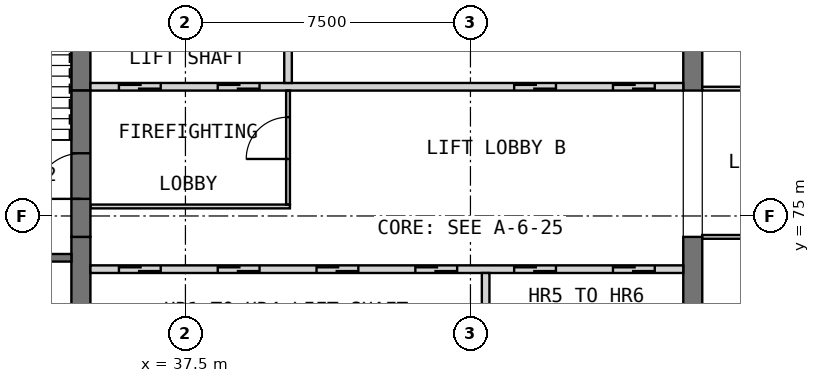
"""IFC4 building model, lengths in metres.
Left out: names, types, materials, properties, quantities, classifications, styles, units other than length and angle.
Written with IfcOpenShell. Run it as: python <this file> out.ifc"""

import sys

from ifc_helpers import new_model, si_unit, direction, frame, frame_2d, origin, place, context, subcontext, project, spatial, rectangle, extrude, element, fill, save


model = new_model("IFC4")
c1 = context("Model", 3, precision=1e-05, world=origin(), true_north=direction((0.0, 1.0)))
c2 = subcontext(c1, "Body", "Model", "MODEL_VIEW")
j1 = project(units=[si_unit("LENGTHUNIT", "METRE"), si_unit("PLANEANGLEUNIT", "RADIAN")], contexts=[c1])
p1 = place(None, origin())
s1 = spatial("IfcSite", under=j1, at=p1, CompositionType="ELEMENT")
p2 = place(p1, origin())
s2 = spatial("IfcBuilding", under=s1, at=p2, CompositionType="ELEMENT")
p3 = place(p2, frame((0.0, 0.0, 182.7)))
s3 = spatial("IfcBuildingStorey", under=s2, at=p3, CompositionType="ELEMENT", Elevation=182.7)
p4 = place(p3, frame((34.75, 68.05, 0.0), z_axis=(0.0, 0.0, 1.0), x_axis=(0.0, 1.0, 0.0)))
e1 = element("IfcWall", 1, at=p4, inside=s3, PredefinedType="SHEAR", context=c2, shape_type="SweptSolid", body=[
    extrude(rectangle(XDim=6.4, YDim=0.5, at=frame_2d((3.2, 0.0))), origin(), (0.0, 0.0, 1.0), 3.5),
])
p5 = place(p3, frame((34.75, 78.3, 0.0), z_axis=(0.0, 0.0, 1.0), x_axis=(0.0, 1.0, 0.0)))
e2 = element("IfcWall", 2, at=p5, inside=s3, PredefinedType="SHEAR", context=c2, shape_type="SweptSolid", body=[
    extrude(rectangle(XDim=3.4, YDim=0.5, at=frame_2d((1.7, 0.0))), origin(), (0.0, 0.0, 1.0), 3.5),
])
p6 = place(p3, frame((50.85, 68.05, 0.0), z_axis=(0.0, 0.0, 1.0), x_axis=(0.0, 1.0, 0.0)))
e3 = element("IfcWall", 3, at=p6, inside=s3, PredefinedType="SHEAR", context=c2, shape_type="SweptSolid", body=[
    extrude(rectangle(XDim=6.4, YDim=0.5, at=frame_2d((3.2, 0.0))), origin(), (0.0, 0.0, 1.0), 3.5),
])
p7 = place(p3, frame((50.85, 78.3, 0.0), z_axis=(0.0, 0.0, 1.0), x_axis=(0.0, 1.0, 0.0)))
e4 = element("IfcWall", 4, at=p7, inside=s3, PredefinedType="SHEAR", context=c2, shape_type="SweptSolid", body=[
    extrude(rectangle(XDim=3.4, YDim=0.5, at=frame_2d((1.7, 0.0))), origin(), (0.0, 0.0, 1.0), 3.5),
])
p8 = place(p3, frame((35.0, 73.6, 0.0), z_axis=(0.0, 0.0, 1.0), x_axis=(1.0, 0.0, 0.0)))
e5 = element("IfcWall", 5, at=p8, inside=s3, PredefinedType="SOLIDWALL", context=c2, shape_type="SweptSolid", body=[
    extrude(rectangle(XDim=15.6, YDim=0.2, at=frame_2d((7.8, 0.0))), origin(), (0.0, 0.0, 1.0), 3.5),
])
p9 = place(p8, frame((0.75, 0.0, 0.0)))
e6 = element("IfcOpeningElement", 6, at=p9, cuts=e5, PredefinedType="OPENING", context=c2, shape_type="SweptSolid", body=[
    extrude(rectangle(XDim=1.1, YDim=2.1, at=frame_2d((0.55, 1.05))), frame((0.0, 0.11, 0.0), z_axis=(0.0, -1.0, 0.0), x_axis=(1.0, 0.0, 0.0)), (0.0, 0.0, 1.0), 0.22),
])
p10 = place(p8, frame((3.35, 0.0, 0.0)))
e7 = element("IfcOpeningElement", 7, at=p10, cuts=e5, PredefinedType="OPENING", context=c2, shape_type="SweptSolid", body=[
    extrude(rectangle(XDim=1.1, YDim=2.1, at=frame_2d((0.55, 1.05))), frame((0.0, 0.11, 0.0), z_axis=(0.0, -1.0, 0.0), x_axis=(1.0, 0.0, 0.0)), (0.0, 0.0, 1.0), 0.22),
])
p11 = place(p8, frame((5.95, 0.0, 0.0)))
e8 = element("IfcOpeningElement", 8, at=p11, cuts=e5, PredefinedType="OPENING", context=c2, shape_type="SweptSolid", body=[
    extrude(rectangle(XDim=1.1, YDim=2.1, at=frame_2d((0.55, 1.05))), frame((0.0, 0.11, 0.0), z_axis=(0.0, -1.0, 0.0), x_axis=(1.0, 0.0, 0.0)), (0.0, 0.0, 1.0), 0.22),
])
p12 = place(p8, frame((8.55, 0.0, 0.0)))
e9 = element("IfcOpeningElement", 9, at=p12, cuts=e5, PredefinedType="OPENING", context=c2, shape_type="SweptSolid", body=[
    extrude(rectangle(XDim=1.1, YDim=2.1, at=frame_2d((0.55, 1.05))), frame((0.0, 0.11, 0.0), z_axis=(0.0, -1.0, 0.0), x_axis=(1.0, 0.0, 0.0)), (0.0, 0.0, 1.0), 0.22),
])
p13 = place(p8, frame((11.15, 0.0, 0.0)))
e10 = element("IfcOpeningElement", 10, at=p13, cuts=e5, PredefinedType="OPENING", context=c2, shape_type="SweptSolid", body=[
    extrude(rectangle(XDim=1.1, YDim=2.1, at=frame_2d((0.55, 1.05))), frame((0.0, 0.11, 0.0), z_axis=(0.0, -1.0, 0.0), x_axis=(1.0, 0.0, 0.0)), (0.0, 0.0, 1.0), 0.22),
])
p14 = place(p8, frame((13.75, 0.0, 0.0)))
e11 = element("IfcOpeningElement", 11, at=p14, cuts=e5, PredefinedType="OPENING", context=c2, shape_type="SweptSolid", body=[
    extrude(rectangle(XDim=1.1, YDim=2.1, at=frame_2d((0.55, 1.05))), frame((0.0, 0.11, 0.0), z_axis=(0.0, -1.0, 0.0), x_axis=(1.0, 0.0, 0.0)), (0.0, 0.0, 1.0), 0.22),
])
p15 = place(p3, frame((45.4, 71.5, 0.0), z_axis=(0.0, 0.0, 1.0), x_axis=(0.0, 1.0, 0.0)))
e12 = element("IfcWall", 12, at=p15, inside=s3, PredefinedType="SOLIDWALL", context=c2, shape_type="SweptSolid", body=[
    extrude(rectangle(XDim=2.0, YDim=0.2, at=frame_2d((1.0, 0.0))), origin(), (0.0, 0.0, 1.0), 3.5),
])
p16 = place(p3, frame((35.0, 78.4, 0.0), z_axis=(0.0, 0.0, 1.0), x_axis=(1.0, 0.0, 0.0)))
e13 = element("IfcWall", 13, at=p16, inside=s3, PredefinedType="SOLIDWALL", context=c2, shape_type="SweptSolid", body=[
    extrude(rectangle(XDim=15.6, YDim=0.2, at=frame_2d((7.8, 0.0))), origin(), (0.0, 0.0, 1.0), 3.5),
])
p17 = place(p16, frame((0.75, 0.0, 0.0)))
e14 = element("IfcOpeningElement", 14, at=p17, cuts=e13, PredefinedType="OPENING", context=c2, shape_type="SweptSolid", body=[
    extrude(rectangle(XDim=1.1, YDim=2.1, at=frame_2d((0.55, 1.05))), frame((0.0, 0.11, 0.0), z_axis=(0.0, -1.0, 0.0), x_axis=(1.0, 0.0, 0.0)), (0.0, 0.0, 1.0), 0.22),
])
p18 = place(p16, frame((3.35, 0.0, 0.0)))
e15 = element("IfcOpeningElement", 15, at=p18, cuts=e13, PredefinedType="OPENING", context=c2, shape_type="SweptSolid", body=[
    extrude(rectangle(XDim=1.1, YDim=2.1, at=frame_2d((0.55, 1.05))), frame((0.0, 0.11, 0.0), z_axis=(0.0, -1.0, 0.0), x_axis=(1.0, 0.0, 0.0)), (0.0, 0.0, 1.0), 0.22),
])
p19 = place(p16, frame((11.15, 0.0, 0.0)))
e16 = element("IfcOpeningElement", 16, at=p19, cuts=e13, PredefinedType="OPENING", context=c2, shape_type="SweptSolid", body=[
    extrude(rectangle(XDim=1.1, YDim=2.1, at=frame_2d((0.55, 1.05))), frame((0.0, 0.11, 0.0), z_axis=(0.0, -1.0, 0.0), x_axis=(1.0, 0.0, 0.0)), (0.0, 0.0, 1.0), 0.22),
])
p20 = place(p16, frame((13.75, 0.0, 0.0)))
e17 = element("IfcOpeningElement", 17, at=p20, cuts=e13, PredefinedType="OPENING", context=c2, shape_type="SweptSolid", body=[
    extrude(rectangle(XDim=1.1, YDim=2.1, at=frame_2d((0.55, 1.05))), frame((0.0, 0.11, 0.0), z_axis=(0.0, -1.0, 0.0), x_axis=(1.0, 0.0, 0.0)), (0.0, 0.0, 1.0), 0.22),
])
p21 = place(p3, frame((40.2, 78.5, 0.0), z_axis=(0.0, 0.0, 1.0), x_axis=(0.0, 1.0, 0.0)))
e18 = element("IfcWall", 18, at=p21, inside=s3, PredefinedType="SOLIDWALL", context=c2, shape_type="SweptSolid", body=[
    extrude(rectangle(XDim=3.2, YDim=0.2, at=frame_2d((1.6, 0.0))), origin(), (0.0, 0.0, 1.0), 3.5),
])
p22 = place(p3, frame((35.0, 75.25, 0.0), z_axis=(0.0, 0.0, 1.0), x_axis=(1.0, 0.0, 0.0)))
e19 = element("IfcWall", 19, at=p22, inside=s3, PredefinedType="PARTITIONING", context=c2, shape_type="SweptSolid", body=[
    extrude(rectangle(XDim=5.25, YDim=0.1, at=frame_2d((2.625, 0.0))), origin(), (0.0, 0.0, 1.0), 3.25),
])
p23 = place(p3, frame((40.2, 75.3, 0.0), z_axis=(0.0, 0.0, 1.0), x_axis=(0.0, 1.0, 0.0)))
e20 = element("IfcWall", 20, at=p23, inside=s3, PredefinedType="PARTITIONING", context=c2, shape_type="SweptSolid", body=[
    extrude(rectangle(XDim=3.0, YDim=0.1, at=frame_2d((1.5, 0.0))), origin(), (0.0, 0.0, 1.0), 3.25),
])
p24 = place(p23, frame((1.2, 0.0, 0.0)))
e21 = element("IfcOpeningElement", 21, at=p24, cuts=e20, PredefinedType="OPENING", context=c2, shape_type="SweptSolid", body=[
    extrude(rectangle(XDim=1.1, YDim=2.1, at=frame_2d((0.55, 1.05))), frame((0.0, 0.06, 0.0), z_axis=(0.0, -1.0, 0.0), x_axis=(1.0, 0.0, 0.0)), (0.0, 0.0, 1.0), 0.12),
])
p25 = place(p3, frame((34.75, 74.45, 0.0), z_axis=(0.0, 0.0, 1.0), x_axis=(0.0, 1.0, 0.0)))
e22 = element("IfcWall", 22, at=p25, inside=s3, PredefinedType="SOLIDWALL", context=c2, shape_type="SweptSolid", body=[
    extrude(rectangle(XDim=3.85, YDim=0.5, at=frame_2d((1.925, 0.0))), origin(), (0.0, 0.0, 1.0), 2.3),
])
p26 = place(p25, frame((1.0, 0.0, 0.0)))
e23 = element("IfcOpeningElement", 23, at=p26, cuts=e22, PredefinedType="OPENING", context=c2, shape_type="SweptSolid", body=[
    extrude(rectangle(XDim=1.2, YDim=2.1, at=frame_2d((0.6, 1.05))), frame((0.0, 0.26, 0.0), z_axis=(0.0, -1.0, 0.0), x_axis=(1.0, 0.0, 0.0)), (0.0, 0.0, 1.0), 0.52),
])
p27 = place(p3, frame((30.8, 73.9, 0.0), z_axis=(0.0, 0.0, 1.0), x_axis=(1.0, 0.0, 0.0)))
e24 = element("IfcWall", 24, at=p27, inside=s3, PredefinedType="SOLIDWALL", context=c2, shape_type="SweptSolid", body=[
    extrude(rectangle(XDim=3.7, YDim=0.2, at=frame_2d((1.85, 0.0))), origin(), (0.0, 0.0, 1.0), 3.25),
])
p28 = place(p27, frame((1.5, 0.0, 0.0)))
e25 = element("IfcOpeningElement", 25, at=p28, cuts=e24, PredefinedType="OPENING", context=c2, shape_type="SweptSolid", body=[
    extrude(rectangle(XDim=0.9, YDim=2.1, at=frame_2d((0.45, 1.05))), frame((0.0, 0.11, 0.0), z_axis=(0.0, -1.0, 0.0), x_axis=(1.0, 0.0, 0.0)), (0.0, 0.0, 1.0), 0.22),
])
p29 = place(p3, frame((51.1, 74.45, 0.0), z_axis=(0.0, 0.0, 1.0), x_axis=(1.0, 0.0, 0.0)))
e26 = element("IfcWall", 26, at=p29, inside=s3, PredefinedType="PARTITIONING", context=c2, shape_type="SweptSolid", body=[
    extrude(rectangle(XDim=8.1, YDim=0.1, at=frame_2d((4.05, 0.0))), origin(), (0.0, 0.0, 1.0), 3.25),
])
p30 = place(p29, frame((3.6, 0.0, 0.0)))
e27 = element("IfcOpeningElement", 27, at=p30, cuts=e26, PredefinedType="OPENING", context=c2, shape_type="SweptSolid", body=[
    extrude(rectangle(XDim=0.9, YDim=2.1, at=frame_2d((0.45, 1.05))), frame((0.0, 0.06, 0.0), z_axis=(0.0, -1.0, 0.0), x_axis=(1.0, 0.0, 0.0)), (0.0, 0.0, 1.0), 0.12),
])
p31 = place(p3, frame((51.1, 78.35, 0.0), z_axis=(0.0, 0.0, 1.0), x_axis=(1.0, 0.0, 0.0)))
e28 = element("IfcWall", 28, at=p31, inside=s3, PredefinedType="PARTITIONING", context=c2, shape_type="SweptSolid", body=[
    extrude(rectangle(XDim=8.1, YDim=0.1, at=frame_2d((4.05, 0.0))), origin(), (0.0, 0.0, 1.0), 3.25),
])
p32 = place(p31, frame((3.6, 0.0, 0.0)))
e29 = element("IfcOpeningElement", 29, at=p32, cuts=e28, PredefinedType="OPENING", context=c2, shape_type="SweptSolid", body=[
    extrude(rectangle(XDim=0.9, YDim=2.1, at=frame_2d((0.45, 1.05))), frame((0.0, 0.06, 0.0), z_axis=(0.0, -1.0, 0.0), x_axis=(1.0, 0.0, 0.0)), (0.0, 0.0, 1.0), 0.12),
])
p33 = place(p9, origin())
e30 = element("IfcDoor", 30, at=p33, inside=s3, OperationType="DOUBLE_DOOR_SLIDING", PredefinedType="DOOR", context=c2, shape_type="SweptSolid", body=[
    extrude(rectangle(XDim=1.1, YDim=2.1, at=frame_2d((0.55, 1.05))), frame((0.0, 0.025, 0.0), z_axis=(0.0, -1.0, 0.0), x_axis=(1.0, 0.0, 0.0)), (0.0, 0.0, 1.0), 0.05),
])
fill(e6, e30)
p34 = place(p10, origin())
e31 = element("IfcDoor", 31, at=p34, inside=s3, OperationType="DOUBLE_DOOR_SLIDING", PredefinedType="DOOR", context=c2, shape_type="SweptSolid", body=[
    extrude(rectangle(XDim=1.1, YDim=2.1, at=frame_2d((0.55, 1.05))), frame((0.0, 0.025, 0.0), z_axis=(0.0, -1.0, 0.0), x_axis=(1.0, 0.0, 0.0)), (0.0, 0.0, 1.0), 0.05),
])
fill(e7, e31)
p35 = place(p11, origin())
e32 = element("IfcDoor", 32, at=p35, inside=s3, OperationType="DOUBLE_DOOR_SLIDING", PredefinedType="DOOR", context=c2, shape_type="SweptSolid", body=[
    extrude(rectangle(XDim=1.1, YDim=2.1, at=frame_2d((0.55, 1.05))), frame((0.0, 0.025, 0.0), z_axis=(0.0, -1.0, 0.0), x_axis=(1.0, 0.0, 0.0)), (0.0, 0.0, 1.0), 0.05),
])
fill(e8, e32)
p36 = place(p12, origin())
e33 = element("IfcDoor", 33, at=p36, inside=s3, OperationType="DOUBLE_DOOR_SLIDING", PredefinedType="DOOR", context=c2, shape_type="SweptSolid", body=[
    extrude(rectangle(XDim=1.1, YDim=2.1, at=frame_2d((0.55, 1.05))), frame((0.0, 0.025, 0.0), z_axis=(0.0, -1.0, 0.0), x_axis=(1.0, 0.0, 0.0)), (0.0, 0.0, 1.0), 0.05),
])
fill(e9, e33)
p37 = place(p13, origin())
e34 = element("IfcDoor", 34, at=p37, inside=s3, OperationType="DOUBLE_DOOR_SLIDING", PredefinedType="DOOR", context=c2, shape_type="SweptSolid", body=[
    extrude(rectangle(XDim=1.1, YDim=2.1, at=frame_2d((0.55, 1.05))), frame((0.0, 0.025, 0.0), z_axis=(0.0, -1.0, 0.0), x_axis=(1.0, 0.0, 0.0)), (0.0, 0.0, 1.0), 0.05),
])
fill(e10, e34)
p38 = place(p14, origin())
e35 = element("IfcDoor", 35, at=p38, inside=s3, OperationType="DOUBLE_DOOR_SLIDING", PredefinedType="DOOR", context=c2, shape_type="SweptSolid", body=[
    extrude(rectangle(XDim=1.1, YDim=2.1, at=frame_2d((0.55, 1.05))), frame((0.0, 0.025, 0.0), z_axis=(0.0, -1.0, 0.0), x_axis=(1.0, 0.0, 0.0)), (0.0, 0.0, 1.0), 0.05),
])
fill(e11, e35)
p39 = place(p17, origin())
e36 = element("IfcDoor", 36, at=p39, inside=s3, OperationType="DOUBLE_DOOR_SLIDING", PredefinedType="DOOR", context=c2, shape_type="SweptSolid", body=[
    extrude(rectangle(XDim=1.1, YDim=2.1, at=frame_2d((0.55, 1.05))), frame((0.0, 0.025, 0.0), z_axis=(0.0, -1.0, 0.0), x_axis=(1.0, 0.0, 0.0)), (0.0, 0.0, 1.0), 0.05),
])
fill(e14, e36)
p40 = place(p18, origin())
e37 = element("IfcDoor", 37, at=p40, inside=s3, OperationType="DOUBLE_DOOR_SLIDING", PredefinedType="DOOR", context=c2, shape_type="SweptSolid", body=[
    extrude(rectangle(XDim=1.1, YDim=2.1, at=frame_2d((0.55, 1.05))), frame((0.0, 0.025, 0.0), z_axis=(0.0, -1.0, 0.0), x_axis=(1.0, 0.0, 0.0)), (0.0, 0.0, 1.0), 0.05),
])
fill(e15, e37)
p41 = place(p19, origin())
e38 = element("IfcDoor", 38, at=p41, inside=s3, OperationType="DOUBLE_DOOR_SLIDING", PredefinedType="DOOR", context=c2, shape_type="SweptSolid", body=[
    extrude(rectangle(XDim=1.1, YDim=2.1, at=frame_2d((0.55, 1.05))), frame((0.0, 0.025, 0.0), z_axis=(0.0, -1.0, 0.0), x_axis=(1.0, 0.0, 0.0)), (0.0, 0.0, 1.0), 0.05),
])
fill(e16, e38)
p42 = place(p20, origin())
e39 = element("IfcDoor", 39, at=p42, inside=s3, OperationType="DOUBLE_DOOR_SLIDING", PredefinedType="DOOR", context=c2, shape_type="SweptSolid", body=[
    extrude(rectangle(XDim=1.1, YDim=2.1, at=frame_2d((0.55, 1.05))), frame((0.0, 0.025, 0.0), z_axis=(0.0, -1.0, 0.0), x_axis=(1.0, 0.0, 0.0)), (0.0, 0.0, 1.0), 0.05),
])
fill(e17, e39)
p43 = place(p24, origin())
e40 = element("IfcDoor", 40, at=p43, inside=s3, OperationType="SINGLE_SWING_LEFT", PredefinedType="DOOR", context=c2, shape_type="SweptSolid", body=[
    extrude(rectangle(XDim=1.1, YDim=2.1, at=frame_2d((0.55, 1.05))), frame((0.0, 0.025, 0.0), z_axis=(0.0, -1.0, 0.0), x_axis=(1.0, 0.0, 0.0)), (0.0, 0.0, 1.0), 0.05),
])
fill(e21, e40)
p44 = place(p26, origin())
e41 = element("IfcDoor", 41, at=p44, inside=s3, OperationType="SINGLE_SWING_RIGHT", PredefinedType="DOOR", context=c2, shape_type="SweptSolid", body=[
    extrude(rectangle(XDim=1.2, YDim=2.1, at=frame_2d((0.6, 1.05))), frame((0.0, 0.025, 0.0), z_axis=(0.0, -1.0, 0.0), x_axis=(1.0, 0.0, 0.0)), (0.0, 0.0, 1.0), 0.05),
])
fill(e23, e41)
save(model, sys.argv[1])
